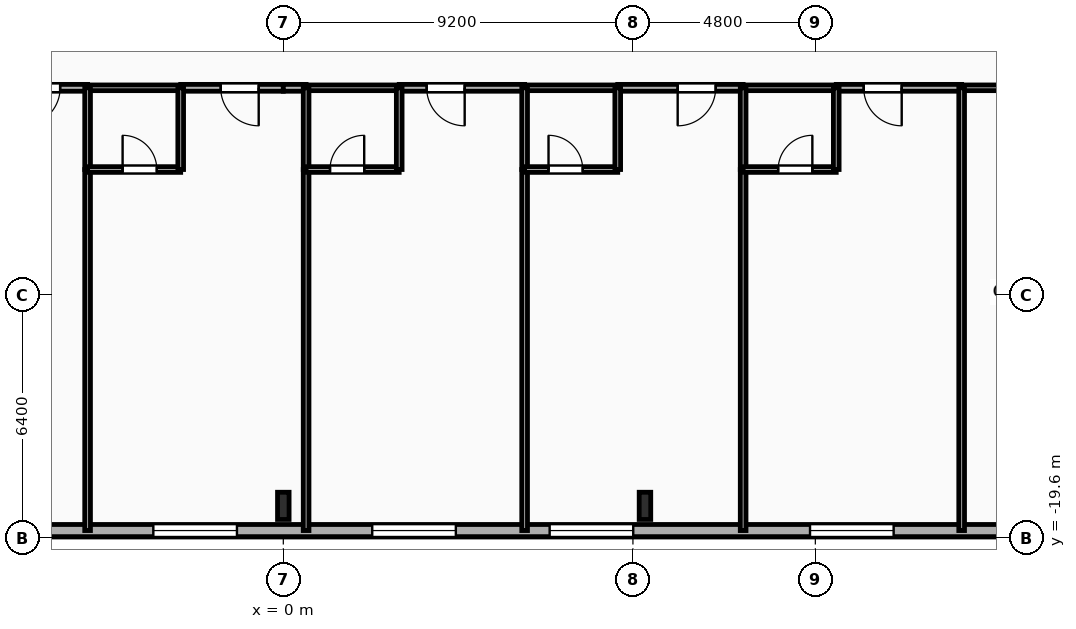
"""IFC4 building model, lengths in metres.
Left out: names, types, materials, properties, quantities, classifications, styles, units other than length and angle.
Written with IfcOpenShell. Run it as: python <this file> out.ifc"""

import sys

from ifc_helpers import new_model, si_unit, direction, frame, frame_2d, origin, origin_2d, place, context, subcontext, project, spatial, rectangle, i_section, extrude, element, fill, save


model = new_model("IFC4")
c1 = context("Model", 3, precision=1e-05, world=origin(), true_north=direction((0.0, 1.0)))
c2 = subcontext(c1, "Body", "Model", "MODEL_VIEW")
j1 = project(units=[si_unit("LENGTHUNIT", "METRE"), si_unit("PLANEANGLEUNIT", "RADIAN")], contexts=[c1])
p1 = place(None, origin())
s1 = spatial("IfcSite", under=j1, at=p1, CompositionType="ELEMENT")
p2 = place(p1, origin())
s2 = spatial("IfcBuilding", under=s1, at=p2, CompositionType="ELEMENT")
p3 = place(p2, frame((0.0, 0.0, 63.85)))
s3 = spatial("IfcBuildingStorey", under=s2, at=p3, CompositionType="ELEMENT", Elevation=63.85)
for number, where, z_axis, x_axis in (
    (1, (0.0, -18.75, 0.0), (0.0, 0.0, 1.0), (1.0, 0.0, 0.0)),
    (2, (9.517, -18.75, 0.0), (0.0, 0.0, 1.0), (1.0, 0.0, 0.0)),
):
    element("IfcColumn", number, at=place(p3, frame(where, z_axis=z_axis, x_axis=x_axis)), inside=s3, PredefinedType="COLUMN", context=c2, shape_type="SweptSolid", body=[
        extrude(i_section(OverallWidth=0.304, OverallDepth=0.716, WebThickness=0.021, FlangeThickness=0.04, FilletRadius=0.027, at=origin_2d()), origin(), (0.0, 0.0, 1.0), 3.35),
    ])
p4 = place(p3, frame((29.2, -19.4, 0.0), z_axis=(0.0, 0.0, 1.0), x_axis=(-1.0, 0.0, 0.0)))
e3 = element("IfcWall", 3, at=p4, inside=s3, PredefinedType="SOLIDWALL", context=c2, shape_type="SweptSolid", body=[
    extrude(rectangle(XDim=58.4, YDim=0.32, at=frame_2d((29.2, 0.0))), origin(), (0.0, 0.0, 1.0), 3.035),
])
p5 = place(p4, frame((2.535, 0.0, 0.85)))
e4 = element("IfcOpeningElement", 4, at=p5, cuts=e3, PredefinedType="OPENING", context=c2, shape_type="SweptSolid", body=[
    extrude(rectangle(XDim=1.65, YDim=1.85, at=frame_2d((0.825, 0.925))), frame((0.0, 0.17, 0.0), z_axis=(0.0, -1.0, 0.0), x_axis=(1.0, 0.0, 0.0)), (0.0, 0.0, 1.0), 0.34),
])
p6 = place(p4, frame((7.975, 0.0, 0.85)))
e5 = element("IfcOpeningElement", 5, at=p6, cuts=e3, PredefinedType="OPENING", context=c2, shape_type="SweptSolid", body=[
    extrude(rectangle(XDim=1.65, YDim=1.85, at=frame_2d((0.825, 0.925))), frame((0.0, 0.17, 0.0), z_axis=(0.0, -1.0, 0.0), x_axis=(1.0, 0.0, 0.0)), (0.0, 0.0, 1.0), 0.34),
])
p7 = place(p4, frame((13.14, 0.0, 0.85)))
e6 = element("IfcOpeningElement", 6, at=p7, cuts=e3, PredefinedType="OPENING", context=c2, shape_type="SweptSolid", body=[
    extrude(rectangle(XDim=2.2, YDim=1.85, at=frame_2d((1.1, 0.925))), frame((0.0, 0.17, 0.0), z_axis=(0.0, -1.0, 0.0), x_axis=(1.0, 0.0, 0.0)), (0.0, 0.0, 1.0), 0.34),
])
p8 = place(p4, frame((19.992, 0.0, 0.85)))
e7 = element("IfcOpeningElement", 7, at=p8, cuts=e3, PredefinedType="OPENING", context=c2, shape_type="SweptSolid", body=[
    extrude(rectangle(XDim=2.2, YDim=1.85, at=frame_2d((1.1, 0.925))), frame((0.0, 0.17, 0.0), z_axis=(0.0, -1.0, 0.0), x_axis=(1.0, 0.0, 0.0)), (0.0, 0.0, 1.0), 0.34),
])
p9 = place(p4, frame((24.66, 0.0, 0.85)))
e8 = element("IfcOpeningElement", 8, at=p9, cuts=e3, PredefinedType="OPENING", context=c2, shape_type="SweptSolid", body=[
    extrude(rectangle(XDim=2.2, YDim=1.85, at=frame_2d((1.1, 0.925))), frame((0.0, 0.17, 0.0), z_axis=(0.0, -1.0, 0.0), x_axis=(1.0, 0.0, 0.0)), (0.0, 0.0, 1.0), 0.34),
])
p10 = place(p4, frame((30.42, 0.0, 0.85)))
e9 = element("IfcOpeningElement", 9, at=p10, cuts=e3, PredefinedType="OPENING", context=c2, shape_type="SweptSolid", body=[
    extrude(rectangle(XDim=2.2, YDim=1.85, at=frame_2d((1.1, 0.925))), frame((0.0, 0.17, 0.0), z_axis=(0.0, -1.0, 0.0), x_axis=(1.0, 0.0, 0.0)), (0.0, 0.0, 1.0), 0.34),
])
p11 = place(p4, frame((36.18, 0.0, 0.85)))
e10 = element("IfcOpeningElement", 10, at=p11, cuts=e3, PredefinedType="OPENING", context=c2, shape_type="SweptSolid", body=[
    extrude(rectangle(XDim=2.2, YDim=1.85, at=frame_2d((1.1, 0.925))), frame((0.0, 0.17, 0.0), z_axis=(0.0, -1.0, 0.0), x_axis=(1.0, 0.0, 0.0)), (0.0, 0.0, 1.0), 0.34),
])
p12 = place(p4, frame((41.94, 0.0, 0.85)))
e11 = element("IfcOpeningElement", 11, at=p12, cuts=e3, PredefinedType="OPENING", context=c2, shape_type="SweptSolid", body=[
    extrude(rectangle(XDim=2.2, YDim=1.85, at=frame_2d((1.1, 0.925))), frame((0.0, 0.17, 0.0), z_axis=(0.0, -1.0, 0.0), x_axis=(1.0, 0.0, 0.0)), (0.0, 0.0, 1.0), 0.34),
])
p13 = place(p4, frame((48.821, 0.0, 0.85)))
e12 = element("IfcOpeningElement", 12, at=p13, cuts=e3, PredefinedType="OPENING", context=c2, shape_type="SweptSolid", body=[
    extrude(rectangle(XDim=1.65, YDim=1.85, at=frame_2d((0.825, 0.925))), frame((0.0, 0.17, 0.0), z_axis=(0.0, -1.0, 0.0), x_axis=(1.0, 0.0, 0.0)), (0.0, 0.0, 1.0), 0.34),
])
p14 = place(p4, frame((53.775, 0.0, 0.85)))
e13 = element("IfcOpeningElement", 13, at=p14, cuts=e3, PredefinedType="OPENING", context=c2, shape_type="SweptSolid", body=[
    extrude(rectangle(XDim=1.65, YDim=1.85, at=frame_2d((0.825, 0.925))), frame((0.0, 0.17, 0.0), z_axis=(0.0, -1.0, 0.0), x_axis=(1.0, 0.0, 0.0)), (0.0, 0.0, 1.0), 0.34),
])
p15 = place(p3, frame((-5.15, -7.75, 0.0), z_axis=(0.0, 0.0, 1.0), x_axis=(-1.0, 0.0, 0.0)))
e14 = element("IfcWall", 14, at=p15, inside=s3, PredefinedType="PARTITIONING", context=c2, shape_type="SweptSolid", body=[
    extrude(rectangle(XDim=3.3, YDim=0.18, at=frame_2d((1.65, 0.0))), origin(), (0.0, 0.0, 1.0), 3.035),
])
p16 = place(p15, frame((0.722, 0.0, 0.0)))
e15 = element("IfcOpeningElement", 15, at=p16, cuts=e14, PredefinedType="OPENING", context=c2, shape_type="SweptSolid", body=[
    extrude(rectangle(XDim=1.0, YDim=2.15, at=frame_2d((0.5, 1.075))), frame((0.0, 0.1, 0.0), z_axis=(0.0, -1.0, 0.0), x_axis=(1.0, 0.0, 0.0)), (0.0, 0.0, 1.0), 0.2),
])
p17 = place(p3, frame((0.0, -7.75, 0.0), z_axis=(0.0, 0.0, 1.0), x_axis=(-1.0, 0.0, 0.0)))
e16 = element("IfcWall", 16, at=p17, inside=s3, PredefinedType="PARTITIONING", context=c2, shape_type="SweptSolid", body=[
    extrude(rectangle(XDim=2.7, YDim=0.18, at=frame_2d((1.35, 0.0))), origin(), (0.0, 0.0, 1.0), 3.035),
])
p18 = place(p17, frame((0.647, 0.0, 0.0)))
e17 = element("IfcOpeningElement", 17, at=p18, cuts=e16, PredefinedType="OPENING", context=c2, shape_type="SweptSolid", body=[
    extrude(rectangle(XDim=1.0, YDim=2.15, at=frame_2d((0.5, 1.075))), frame((0.0, 0.1, 0.0), z_axis=(0.0, -1.0, 0.0), x_axis=(1.0, 0.0, 0.0)), (0.0, 0.0, 1.0), 0.2),
])
p19 = place(p3, frame((-2.7, -7.75, 0.0), z_axis=(0.0, 0.0, 1.0), x_axis=(-1.0, 0.0, 0.0)))
e18 = element("IfcWall", 18, at=p19, inside=s3, PredefinedType="PLUMBINGWALL", context=c2, shape_type="SweptSolid", body=[
    extrude(rectangle(XDim=2.45, YDim=0.15, at=frame_2d((1.225, 0.0))), origin(), (0.0, 0.0, 1.0), 3.035),
])
p20 = place(p3, frame((0.6, -7.75, 0.0), z_axis=(0.0, 0.0, 1.0), x_axis=(-1.0, 0.0, 0.0)))
e19 = element("IfcWall", 19, at=p20, inside=s3, PredefinedType="PARTITIONING", context=c2, shape_type="SweptSolid", body=[
    extrude(rectangle(XDim=0.6, YDim=0.18, at=frame_2d((0.3, 0.0))), origin(), (0.0, 0.0, 1.0), 3.035),
])
p21 = place(p3, frame((6.35, -7.75, 0.0), z_axis=(0.0, 0.0, 1.0), x_axis=(-1.0, 0.0, 0.0)))
e20 = element("IfcWall", 20, at=p21, inside=s3, PredefinedType="PARTITIONING", context=c2, shape_type="SweptSolid", body=[
    extrude(rectangle(XDim=3.3, YDim=0.18, at=frame_2d((1.65, 0.0))), origin(), (0.0, 0.0, 1.0), 3.035),
])
p22 = place(p21, frame((1.577, 0.0, 0.0)))
e21 = element("IfcOpeningElement", 21, at=p22, cuts=e20, PredefinedType="OPENING", context=c2, shape_type="SweptSolid", body=[
    extrude(rectangle(XDim=1.0, YDim=2.15, at=frame_2d((0.5, 1.075))), frame((0.0, 0.1, 0.0), z_axis=(0.0, -1.0, 0.0), x_axis=(1.0, 0.0, 0.0)), (0.0, 0.0, 1.0), 0.2),
])
p23 = place(p3, frame((3.05, -7.75, 0.0), z_axis=(0.0, 0.0, 1.0), x_axis=(-1.0, 0.0, 0.0)))
e22 = element("IfcWall", 22, at=p23, inside=s3, PredefinedType="PLUMBINGWALL", context=c2, shape_type="SweptSolid", body=[
    extrude(rectangle(XDim=2.45, YDim=0.15, at=frame_2d((1.225, 0.0))), origin(), (0.0, 0.0, 1.0), 3.035),
])
p24 = place(p3, frame((12.1, -7.75, 0.0), z_axis=(0.0, 0.0, 1.0), x_axis=(-1.0, 0.0, 0.0)))
e23 = element("IfcWall", 23, at=p24, inside=s3, PredefinedType="PARTITIONING", context=c2, shape_type="SweptSolid", body=[
    extrude(rectangle(XDim=3.3, YDim=0.18, at=frame_2d((1.65, 0.0))), origin(), (0.0, 0.0, 1.0), 3.035),
])
p25 = place(p24, frame((0.722, 0.0, 0.0)))
e24 = element("IfcOpeningElement", 24, at=p25, cuts=e23, PredefinedType="OPENING", context=c2, shape_type="SweptSolid", body=[
    extrude(rectangle(XDim=1.0, YDim=2.15, at=frame_2d((0.5, 1.075))), frame((0.0, 0.1, 0.0), z_axis=(0.0, -1.0, 0.0), x_axis=(1.0, 0.0, 0.0)), (0.0, 0.0, 1.0), 0.2),
])
p26 = place(p3, frame((8.8, -7.75, 0.0), z_axis=(0.0, 0.0, 1.0), x_axis=(-1.0, 0.0, 0.0)))
e25 = element("IfcWall", 25, at=p26, inside=s3, PredefinedType="PLUMBINGWALL", context=c2, shape_type="SweptSolid", body=[
    extrude(rectangle(XDim=2.45, YDim=0.15, at=frame_2d((1.225, 0.0))), origin(), (0.0, 0.0, 1.0), 3.035),
])
p27 = place(p3, frame((17.85, -7.75, 0.0), z_axis=(0.0, 0.0, 1.0), x_axis=(-1.0, 0.0, 0.0)))
e26 = element("IfcWall", 26, at=p27, inside=s3, PredefinedType="PARTITIONING", context=c2, shape_type="SweptSolid", body=[
    extrude(rectangle(XDim=3.3, YDim=0.18, at=frame_2d((1.65, 0.0))), origin(), (0.0, 0.0, 1.0), 3.035),
])
p28 = place(p27, frame((1.577, 0.0, 0.0)))
e27 = element("IfcOpeningElement", 27, at=p28, cuts=e26, PredefinedType="OPENING", context=c2, shape_type="SweptSolid", body=[
    extrude(rectangle(XDim=1.0, YDim=2.15, at=frame_2d((0.5, 1.075))), frame((0.0, 0.1, 0.0), z_axis=(0.0, -1.0, 0.0), x_axis=(1.0, 0.0, 0.0)), (0.0, 0.0, 1.0), 0.2),
])
p29 = place(p3, frame((14.55, -7.75, 0.0), z_axis=(0.0, 0.0, 1.0), x_axis=(-1.0, 0.0, 0.0)))
e28 = element("IfcWall", 28, at=p29, inside=s3, PredefinedType="PLUMBINGWALL", context=c2, shape_type="SweptSolid", body=[
    extrude(rectangle(XDim=2.45, YDim=0.15, at=frame_2d((1.225, 0.0))), origin(), (0.0, 0.0, 1.0), 3.035),
])
p30 = place(p3, frame((23.0, -7.75, 0.0), z_axis=(0.0, 0.0, 1.0), x_axis=(-1.0, 0.0, 0.0)))
e29 = element("IfcWall", 29, at=p30, inside=s3, PredefinedType="PARTITIONING", context=c2, shape_type="SweptSolid", body=[
    extrude(rectangle(XDim=5.15, YDim=0.15, at=frame_2d((2.575, 0.0))), origin(), (0.0, 0.0, 1.0), 3.035),
])
p31 = place(p30, frame((0.948, 0.0, 0.0)))
e30 = element("IfcOpeningElement", 30, at=p31, cuts=e29, PredefinedType="OPENING", context=c2, shape_type="SweptSolid", body=[
    extrude(rectangle(XDim=1.05, YDim=2.15, at=frame_2d((0.525, 1.075))), frame((0.0, 0.085, 0.0), z_axis=(0.0, -1.0, 0.0), x_axis=(1.0, 0.0, 0.0)), (0.0, 0.0, 1.0), 0.17),
])
p32 = place(p3, frame((-5.15, -9.9, 0.0), z_axis=(0.0, 0.0, 1.0), x_axis=(0.0, -1.0, 0.0)))
e31 = element("IfcWall", 31, at=p32, inside=s3, PredefinedType="PARTITIONING", context=c2, shape_type="SweptSolid", body=[
    extrude(rectangle(XDim=9.5, YDim=0.15, at=frame_2d((4.75, 0.0))), origin(), (0.0, 0.0, 1.0), 3.035),
])
p33 = place(p3, frame((-5.15, -7.75, 0.0), z_axis=(0.0, 0.0, 1.0), x_axis=(0.0, -1.0, 0.0)))
e32 = element("IfcWall", 32, at=p33, inside=s3, PredefinedType="PLUMBINGWALL", context=c2, shape_type="SweptSolid", body=[
    extrude(rectangle(XDim=2.15, YDim=0.15, at=frame_2d((1.075, 0.0))), origin(), (0.0, 0.0, 1.0), 3.035),
])
p34 = place(p3, frame((-5.15, -9.9, 0.0), z_axis=(0.0, 0.0, 1.0), x_axis=(1.0, 0.0, 0.0)))
e33 = element("IfcWall", 33, at=p34, inside=s3, PredefinedType="PLUMBINGWALL", context=c2, shape_type="SweptSolid", body=[
    extrude(rectangle(XDim=2.45, YDim=0.15, at=frame_2d((1.225, 0.0))), origin(), (0.0, 0.0, 1.0), 3.035),
])
p35 = place(p34, frame((0.921, 0.0, 0.0)))
e34 = element("IfcOpeningElement", 34, at=p35, cuts=e33, PredefinedType="OPENING", context=c2, shape_type="SweptSolid", body=[
    extrude(rectangle(XDim=0.9, YDim=2.1, at=frame_2d((0.45, 1.05))), frame((0.0, 0.085, 0.0), z_axis=(0.0, -1.0, 0.0), x_axis=(1.0, 0.0, 0.0)), (0.0, 0.0, 1.0), 0.17),
])
p36 = place(p3, frame((-2.7, -9.9, 0.0), z_axis=(0.0, 0.0, 1.0), x_axis=(0.0, 1.0, 0.0)))
e35 = element("IfcWall", 35, at=p36, inside=s3, PredefinedType="PLUMBINGWALL", context=c2, shape_type="SweptSolid", body=[
    extrude(rectangle(XDim=2.15, YDim=0.15, at=frame_2d((1.075, 0.0))), origin(), (0.0, 0.0, 1.0), 3.035),
])
p37 = place(p3, frame((0.6, -9.9, 0.0), z_axis=(0.0, 0.0, 1.0), x_axis=(0.0, -1.0, 0.0)))
e36 = element("IfcWall", 36, at=p37, inside=s3, PredefinedType="PARTITIONING", context=c2, shape_type="SweptSolid", body=[
    extrude(rectangle(XDim=9.5, YDim=0.15, at=frame_2d((4.75, 0.0))), origin(), (0.0, 0.0, 1.0), 3.035),
])
p38 = place(p3, frame((0.6, -7.75, 0.0), z_axis=(0.0, 0.0, 1.0), x_axis=(0.0, -1.0, 0.0)))
e37 = element("IfcWall", 37, at=p38, inside=s3, PredefinedType="PLUMBINGWALL", context=c2, shape_type="SweptSolid", body=[
    extrude(rectangle(XDim=2.15, YDim=0.15, at=frame_2d((1.075, 0.0))), origin(), (0.0, 0.0, 1.0), 3.035),
])
p39 = place(p3, frame((0.6, -9.9, 0.0), z_axis=(0.0, 0.0, 1.0), x_axis=(1.0, 0.0, 0.0)))
e38 = element("IfcWall", 38, at=p39, inside=s3, PredefinedType="PLUMBINGWALL", context=c2, shape_type="SweptSolid", body=[
    extrude(rectangle(XDim=2.45, YDim=0.15, at=frame_2d((1.225, 0.0))), origin(), (0.0, 0.0, 1.0), 3.035),
])
p40 = place(p39, frame((0.629, 0.0, 0.0)))
e39 = element("IfcOpeningElement", 39, at=p40, cuts=e38, PredefinedType="OPENING", context=c2, shape_type="SweptSolid", body=[
    extrude(rectangle(XDim=0.9, YDim=2.1, at=frame_2d((0.45, 1.05))), frame((0.0, 0.085, 0.0), z_axis=(0.0, -1.0, 0.0), x_axis=(1.0, 0.0, 0.0)), (0.0, 0.0, 1.0), 0.17),
])
p41 = place(p3, frame((3.05, -9.9, 0.0), z_axis=(0.0, 0.0, 1.0), x_axis=(0.0, 1.0, 0.0)))
e40 = element("IfcWall", 40, at=p41, inside=s3, PredefinedType="PLUMBINGWALL", context=c2, shape_type="SweptSolid", body=[
    extrude(rectangle(XDim=2.15, YDim=0.15, at=frame_2d((1.075, 0.0))), origin(), (0.0, 0.0, 1.0), 3.035),
])
p42 = place(p3, frame((6.35, -9.9, 0.0), z_axis=(0.0, 0.0, 1.0), x_axis=(0.0, -1.0, 0.0)))
e41 = element("IfcWall", 41, at=p42, inside=s3, PredefinedType="PARTITIONING", context=c2, shape_type="SweptSolid", body=[
    extrude(rectangle(XDim=9.5, YDim=0.15, at=frame_2d((4.75, 0.0))), origin(), (0.0, 0.0, 1.0), 3.035),
])
p43 = place(p3, frame((6.35, -7.75, 0.0), z_axis=(0.0, 0.0, 1.0), x_axis=(0.0, -1.0, 0.0)))
e42 = element("IfcWall", 42, at=p43, inside=s3, PredefinedType="PLUMBINGWALL", context=c2, shape_type="SweptSolid", body=[
    extrude(rectangle(XDim=2.15, YDim=0.15, at=frame_2d((1.075, 0.0))), origin(), (0.0, 0.0, 1.0), 3.035),
])
p44 = place(p3, frame((6.35, -9.9, 0.0), z_axis=(0.0, 0.0, 1.0), x_axis=(1.0, 0.0, 0.0)))
e43 = element("IfcWall", 43, at=p44, inside=s3, PredefinedType="PLUMBINGWALL", context=c2, shape_type="SweptSolid", body=[
    extrude(rectangle(XDim=2.45, YDim=0.15, at=frame_2d((1.225, 0.0))), origin(), (0.0, 0.0, 1.0), 3.035),
])
p45 = place(p44, frame((0.629, 0.0, 0.0)))
e44 = element("IfcOpeningElement", 44, at=p45, cuts=e43, PredefinedType="OPENING", context=c2, shape_type="SweptSolid", body=[
    extrude(rectangle(XDim=0.9, YDim=2.1, at=frame_2d((0.45, 1.05))), frame((0.0, 0.085, 0.0), z_axis=(0.0, -1.0, 0.0), x_axis=(1.0, 0.0, 0.0)), (0.0, 0.0, 1.0), 0.17),
])
p46 = place(p3, frame((8.8, -9.9, 0.0), z_axis=(0.0, 0.0, 1.0), x_axis=(0.0, 1.0, 0.0)))
e45 = element("IfcWall", 45, at=p46, inside=s3, PredefinedType="PLUMBINGWALL", context=c2, shape_type="SweptSolid", body=[
    extrude(rectangle(XDim=2.15, YDim=0.15, at=frame_2d((1.075, 0.0))), origin(), (0.0, 0.0, 1.0), 3.035),
])
p47 = place(p3, frame((12.1, -9.9, 0.0), z_axis=(0.0, 0.0, 1.0), x_axis=(0.0, -1.0, 0.0)))
e46 = element("IfcWall", 46, at=p47, inside=s3, PredefinedType="PARTITIONING", context=c2, shape_type="SweptSolid", body=[
    extrude(rectangle(XDim=9.5, YDim=0.15, at=frame_2d((4.75, 0.0))), origin(), (0.0, 0.0, 1.0), 3.035),
])
p48 = place(p3, frame((12.1, -7.75, 0.0), z_axis=(0.0, 0.0, 1.0), x_axis=(0.0, -1.0, 0.0)))
e47 = element("IfcWall", 47, at=p48, inside=s3, PredefinedType="PLUMBINGWALL", context=c2, shape_type="SweptSolid", body=[
    extrude(rectangle(XDim=2.15, YDim=0.15, at=frame_2d((1.075, 0.0))), origin(), (0.0, 0.0, 1.0), 3.035),
])
p49 = place(p3, frame((12.1, -9.9, 0.0), z_axis=(0.0, 0.0, 1.0), x_axis=(1.0, 0.0, 0.0)))
e48 = element("IfcWall", 48, at=p49, inside=s3, PredefinedType="PLUMBINGWALL", context=c2, shape_type="SweptSolid", body=[
    extrude(rectangle(XDim=2.45, YDim=0.15, at=frame_2d((1.225, 0.0))), origin(), (0.0, 0.0, 1.0), 3.035),
])
p50 = place(p49, frame((0.921, 0.0, 0.0)))
e49 = element("IfcOpeningElement", 49, at=p50, cuts=e48, PredefinedType="OPENING", context=c2, shape_type="SweptSolid", body=[
    extrude(rectangle(XDim=0.9, YDim=2.1, at=frame_2d((0.45, 1.05))), frame((0.0, 0.085, 0.0), z_axis=(0.0, -1.0, 0.0), x_axis=(1.0, 0.0, 0.0)), (0.0, 0.0, 1.0), 0.17),
])
p51 = place(p3, frame((14.55, -9.9, 0.0), z_axis=(0.0, 0.0, 1.0), x_axis=(0.0, 1.0, 0.0)))
e50 = element("IfcWall", 50, at=p51, inside=s3, PredefinedType="PLUMBINGWALL", context=c2, shape_type="SweptSolid", body=[
    extrude(rectangle(XDim=2.15, YDim=0.15, at=frame_2d((1.075, 0.0))), origin(), (0.0, 0.0, 1.0), 3.035),
])
p52 = place(p3, frame((17.85, -7.75, 0.0), z_axis=(0.0, 0.0, 1.0), x_axis=(0.0, -1.0, 0.0)))
e51 = element("IfcWall", 51, at=p52, inside=s3, PredefinedType="PARTITIONING", context=c2, shape_type="SweptSolid", body=[
    extrude(rectangle(XDim=11.65, YDim=0.15, at=frame_2d((5.825, 0.0))), origin(), (0.0, 0.0, 1.0), 3.035),
])
p53 = place(p7, origin())
e52 = element("IfcWindow", 52, at=p53, inside=s3, PartitioningType="SINGLE_PANEL", PredefinedType="WINDOW", context=c2, shape_type="SweptSolid", body=[
    extrude(rectangle(XDim=2.2, YDim=1.85, at=frame_2d((1.1, 0.925))), frame((0.0, 0.03, 0.0), z_axis=(0.0, -1.0, 0.0), x_axis=(1.0, 0.0, 0.0)), (0.0, 0.0, 1.0), 0.06),
])
fill(e6, e52)
p54 = place(p8, origin())
e53 = element("IfcWindow", 53, at=p54, inside=s3, PartitioningType="SINGLE_PANEL", PredefinedType="WINDOW", context=c2, shape_type="SweptSolid", body=[
    extrude(rectangle(XDim=2.2, YDim=1.85, at=frame_2d((1.1, 0.925))), frame((0.0, 0.03, 0.0), z_axis=(0.0, -1.0, 0.0), x_axis=(1.0, 0.0, 0.0)), (0.0, 0.0, 1.0), 0.06),
])
fill(e7, e53)
p55 = place(p9, origin())
e54 = element("IfcWindow", 54, at=p55, inside=s3, PartitioningType="SINGLE_PANEL", PredefinedType="WINDOW", context=c2, shape_type="SweptSolid", body=[
    extrude(rectangle(XDim=2.2, YDim=1.85, at=frame_2d((1.1, 0.925))), frame((0.0, 0.03, 0.0), z_axis=(0.0, -1.0, 0.0), x_axis=(1.0, 0.0, 0.0)), (0.0, 0.0, 1.0), 0.06),
])
fill(e8, e54)
p56 = place(p10, origin())
e55 = element("IfcWindow", 55, at=p56, inside=s3, PartitioningType="SINGLE_PANEL", PredefinedType="WINDOW", context=c2, shape_type="SweptSolid", body=[
    extrude(rectangle(XDim=2.2, YDim=1.85, at=frame_2d((1.1, 0.925))), frame((0.0, 0.03, 0.0), z_axis=(0.0, -1.0, 0.0), x_axis=(1.0, 0.0, 0.0)), (0.0, 0.0, 1.0), 0.06),
])
fill(e9, e55)
p57 = place(p16, origin())
e56 = element("IfcDoor", 56, at=p57, inside=s3, OperationType="SINGLE_SWING_RIGHT", PredefinedType="DOOR", context=c2, shape_type="SweptSolid", body=[
    extrude(rectangle(XDim=1.0, YDim=2.15, at=frame_2d((0.5, 1.075))), frame((0.0, 0.025, 0.0), z_axis=(0.0, -1.0, 0.0), x_axis=(1.0, 0.0, 0.0)), (0.0, 0.0, 1.0), 0.05),
])
fill(e15, e56)
p58 = place(p18, origin())
e57 = element("IfcDoor", 57, at=p58, inside=s3, OperationType="SINGLE_SWING_LEFT", PredefinedType="DOOR", context=c2, shape_type="SweptSolid", body=[
    extrude(rectangle(XDim=1.0, YDim=2.15, at=frame_2d((0.5, 1.075))), frame((0.0, 0.025, 0.0), z_axis=(0.0, -1.0, 0.0), x_axis=(1.0, 0.0, 0.0)), (0.0, 0.0, 1.0), 0.05),
])
fill(e17, e57)
p59 = place(p22, origin())
e58 = element("IfcDoor", 58, at=p59, inside=s3, OperationType="SINGLE_SWING_LEFT", PredefinedType="DOOR", context=c2, shape_type="SweptSolid", body=[
    extrude(rectangle(XDim=1.0, YDim=2.15, at=frame_2d((0.5, 1.075))), frame((0.0, 0.025, 0.0), z_axis=(0.0, -1.0, 0.0), x_axis=(1.0, 0.0, 0.0)), (0.0, 0.0, 1.0), 0.05),
])
fill(e21, e58)
p60 = place(p25, origin())
e59 = element("IfcDoor", 59, at=p60, inside=s3, OperationType="SINGLE_SWING_RIGHT", PredefinedType="DOOR", context=c2, shape_type="SweptSolid", body=[
    extrude(rectangle(XDim=1.0, YDim=2.15, at=frame_2d((0.5, 1.075))), frame((0.0, 0.025, 0.0), z_axis=(0.0, -1.0, 0.0), x_axis=(1.0, 0.0, 0.0)), (0.0, 0.0, 1.0), 0.05),
])
fill(e24, e59)
p61 = place(p28, origin())
e60 = element("IfcDoor", 60, at=p61, inside=s3, OperationType="SINGLE_SWING_LEFT", PredefinedType="DOOR", context=c2, shape_type="SweptSolid", body=[
    extrude(rectangle(XDim=1.0, YDim=2.15, at=frame_2d((0.5, 1.075))), frame((0.0, 0.025, 0.0), z_axis=(0.0, -1.0, 0.0), x_axis=(1.0, 0.0, 0.0)), (0.0, 0.0, 1.0), 0.05),
])
fill(e27, e60)
p62 = place(p35, origin())
e61 = element("IfcDoor", 61, at=p62, inside=s3, OperationType="SINGLE_SWING_LEFT", PredefinedType="DOOR", context=c2, shape_type="SweptSolid", body=[
    extrude(rectangle(XDim=0.9, YDim=2.1, at=frame_2d((0.45, 1.05))), frame((0.0, 0.025, 0.0), z_axis=(0.0, -1.0, 0.0), x_axis=(1.0, 0.0, 0.0)), (0.0, 0.0, 1.0), 0.05),
])
fill(e34, e61)
p63 = place(p40, origin())
e62 = element("IfcDoor", 62, at=p63, inside=s3, OperationType="SINGLE_SWING_RIGHT", PredefinedType="DOOR", context=c2, shape_type="SweptSolid", body=[
    extrude(rectangle(XDim=0.9, YDim=2.1, at=frame_2d((0.45, 1.05))), frame((0.0, 0.025, 0.0), z_axis=(0.0, -1.0, 0.0), x_axis=(1.0, 0.0, 0.0)), (0.0, 0.0, 1.0), 0.05),
])
fill(e39, e62)
p64 = place(p45, origin())
e63 = element("IfcDoor", 63, at=p64, inside=s3, OperationType="SINGLE_SWING_LEFT", PredefinedType="DOOR", context=c2, shape_type="SweptSolid", body=[
    extrude(rectangle(XDim=0.9, YDim=2.1, at=frame_2d((0.45, 1.05))), frame((0.0, 0.025, 0.0), z_axis=(0.0, -1.0, 0.0), x_axis=(1.0, 0.0, 0.0)), (0.0, 0.0, 1.0), 0.05),
])
fill(e44, e63)
p65 = place(p50, origin())
e64 = element("IfcDoor", 64, at=p65, inside=s3, OperationType="SINGLE_SWING_RIGHT", PredefinedType="DOOR", context=c2, shape_type="SweptSolid", body=[
    extrude(rectangle(XDim=0.9, YDim=2.1, at=frame_2d((0.45, 1.05))), frame((0.0, 0.025, 0.0), z_axis=(0.0, -1.0, 0.0), x_axis=(1.0, 0.0, 0.0)), (0.0, 0.0, 1.0), 0.05),
])
fill(e49, e64)
save(model, sys.argv[1])
